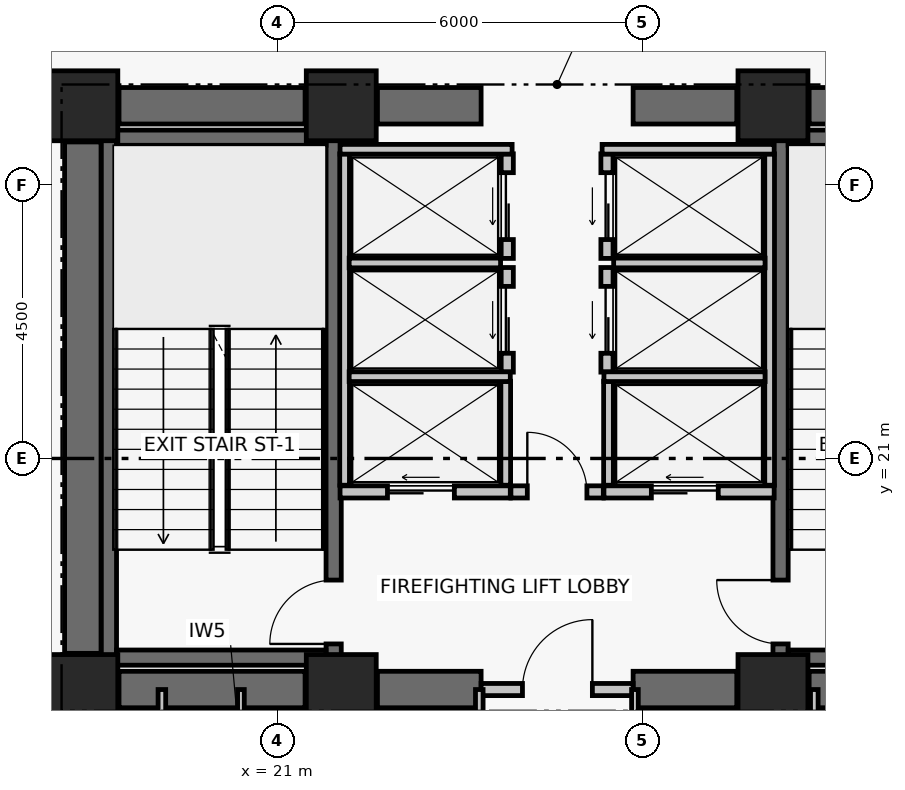
"""IFC4 building model, lengths in metres.
Left out: names, types, materials, properties, quantities, classifications, styles, units other than length and angle.
Written with IfcOpenShell. Run it as: python <this file> out.ifc"""

import sys

from ifc_helpers import new_model, si_unit, direction, frame, frame_2d, origin, origin_2d, place, context, subcontext, project, spatial, rectangle, extrude, element, fill, save


model = new_model("IFC4")
c1 = context("Model", 3, precision=1e-05, world=origin(), true_north=direction((0.0, 1.0)))
c2 = subcontext(c1, "Body", "Model", "MODEL_VIEW")
j1 = project(units=[si_unit("LENGTHUNIT", "METRE"), si_unit("PLANEANGLEUNIT", "RADIAN")], contexts=[c1])
p1 = place(None, origin())
s1 = spatial("IfcSite", under=j1, at=p1, CompositionType="ELEMENT")
p2 = place(p1, origin())
s2 = spatial("IfcBuilding", under=s1, at=p2, CompositionType="ELEMENT")
p3 = place(p2, frame((0.0, 0.0, 61.08)))
s3 = spatial("IfcBuildingStorey", under=s2, at=p3, CompositionType="ELEMENT", Elevation=61.08)
for number, where, z_axis, x_axis in (
    (1, (17.8, 17.2, 0.0), (0.0, 0.0, 1.0), (1.0, 0.0, 0.0)),
    (2, (22.05, 17.2, 0.0), (0.0, 0.0, 1.0), (1.0, 0.0, 0.0)),
    (3, (29.15, 17.2, 0.0), (0.0, 0.0, 1.0), (1.0, 0.0, 0.0)),
    (4, (17.8, 26.8, 0.0), (0.0, 0.0, 1.0), (1.0, 0.0, 0.0)),
    (5, (22.05, 26.8, 0.0), (0.0, 0.0, 1.0), (1.0, 0.0, 0.0)),
    (6, (29.15, 26.8, 0.0), (0.0, 0.0, 1.0), (1.0, 0.0, 0.0)),
):
    element("IfcColumn", number, at=place(p3, frame(where, z_axis=z_axis, x_axis=x_axis)), inside=s3, PredefinedType="COLUMN", context=c2, shape_type="SweptSolid", body=[
        extrude(rectangle(XDim=1.15, YDim=1.15, at=origin_2d()), origin(), (0.0, 0.0, 1.0), 3.72),
    ])
p4 = place(p3, frame((18.395, 17.2, 0.0), z_axis=(0.0, 0.0, 1.0), x_axis=(1.0, 0.0, 0.0)))
e7 = element("IfcWall", 7, at=p4, inside=s3, PredefinedType="SHEAR", context=c2, shape_type="SweptSolid", body=[
    extrude(rectangle(XDim=3.06, YDim=0.6, at=frame_2d((1.53, 0.0))), origin(), (0.0, 0.0, 1.0), 3.47),
])
p5 = place(p3, frame((22.645, 17.2, 0.0), z_axis=(0.0, 0.0, 1.0), x_axis=(1.0, 0.0, 0.0)))
e8 = element("IfcWall", 8, at=p5, inside=s3, PredefinedType="SHEAR", context=c2, shape_type="SweptSolid", body=[
    extrude(rectangle(XDim=1.705, YDim=0.6, at=frame_2d((0.853, 0.0))), origin(), (0.0, 0.0, 1.0), 3.47),
])
p6 = place(p3, frame((26.85, 17.2, 0.0), z_axis=(0.0, 0.0, 1.0), x_axis=(1.0, 0.0, 0.0)))
e9 = element("IfcWall", 9, at=p6, inside=s3, PredefinedType="SHEAR", context=c2, shape_type="SweptSolid", body=[
    extrude(rectangle(XDim=1.705, YDim=0.6, at=frame_2d((0.853, 0.0))), origin(), (0.0, 0.0, 1.0), 3.47),
])
p7 = place(p3, frame((29.745, 17.2, 0.0), z_axis=(0.0, 0.0, 1.0), x_axis=(1.0, 0.0, 0.0)))
e10 = element("IfcWall", 10, at=p7, inside=s3, PredefinedType="SHEAR", context=c2, shape_type="SweptSolid", body=[
    extrude(rectangle(XDim=3.06, YDim=0.6, at=frame_2d((1.53, 0.0))), origin(), (0.0, 0.0, 1.0), 3.47),
])
p8 = place(p3, frame((18.395, 26.8, 0.0), z_axis=(0.0, 0.0, 1.0), x_axis=(1.0, 0.0, 0.0)))
e11 = element("IfcWall", 11, at=p8, inside=s3, PredefinedType="SHEAR", context=c2, shape_type="SweptSolid", body=[
    extrude(rectangle(XDim=3.06, YDim=0.6, at=frame_2d((1.53, 0.0))), origin(), (0.0, 0.0, 1.0), 3.47),
])
p9 = place(p3, frame((22.645, 26.8, 0.0), z_axis=(0.0, 0.0, 1.0), x_axis=(1.0, 0.0, 0.0)))
e12 = element("IfcWall", 12, at=p9, inside=s3, PredefinedType="SHEAR", context=c2, shape_type="SweptSolid", body=[
    extrude(rectangle(XDim=1.705, YDim=0.6, at=frame_2d((0.853, 0.0))), origin(), (0.0, 0.0, 1.0), 3.47),
])
p10 = place(p3, frame((26.85, 26.8, 0.0), z_axis=(0.0, 0.0, 1.0), x_axis=(1.0, 0.0, 0.0)))
e13 = element("IfcWall", 13, at=p10, inside=s3, PredefinedType="SHEAR", context=c2, shape_type="SweptSolid", body=[
    extrude(rectangle(XDim=1.705, YDim=0.6, at=frame_2d((0.853, 0.0))), origin(), (0.0, 0.0, 1.0), 3.47),
])
p11 = place(p3, frame((29.745, 26.8, 0.0), z_axis=(0.0, 0.0, 1.0), x_axis=(1.0, 0.0, 0.0)))
e14 = element("IfcWall", 14, at=p11, inside=s3, PredefinedType="SHEAR", context=c2, shape_type="SweptSolid", body=[
    extrude(rectangle(XDim=3.06, YDim=0.6, at=frame_2d((1.53, 0.0))), origin(), (0.0, 0.0, 1.0), 3.47),
])
p12 = place(p3, frame((17.8, 17.795, 0.0), z_axis=(0.0, 0.0, 1.0), x_axis=(0.0, 1.0, 0.0)))
e15 = element("IfcWall", 15, at=p12, inside=s3, PredefinedType="SHEAR", context=c2, shape_type="SweptSolid", body=[
    extrude(rectangle(XDim=8.41, YDim=0.6, at=frame_2d((4.205, 0.0))), origin(), (0.0, 0.0, 1.0), 3.47),
])
p13 = place(p3, frame((18.229, 17.6, 0.0), z_axis=(0.0, 0.0, 1.0), x_axis=(0.0, 1.0, 0.0)))
e16 = element("IfcWall", 16, at=p13, inside=s3, PredefinedType="SHEAR", context=c2, shape_type="SweptSolid", body=[
    extrude(rectangle(XDim=8.8, YDim=0.25, at=frame_2d((4.4, 0.0))), origin(), (0.0, 0.0, 1.0), 3.47),
])
p14 = place(p3, frame((21.925, 17.6, 0.0), z_axis=(0.0, 0.0, 1.0), x_axis=(0.0, 1.0, 0.0)))
e17 = element("IfcWall", 17, at=p14, inside=s3, PredefinedType="SHEAR", context=c2, shape_type="SweptSolid", body=[
    extrude(rectangle(XDim=8.8, YDim=0.25, at=frame_2d((4.4, 0.0))), origin(), (0.0, 0.0, 1.0), 3.47),
])
p15 = place(p14, frame((0.35, 0.0, 0.0)))
e18 = element("IfcOpeningElement", 18, at=p15, cuts=e17, PredefinedType="OPENING", context=c2, shape_type="SweptSolid", body=[
    extrude(rectangle(XDim=1.05, YDim=2.08, at=frame_2d((0.525, 1.04))), frame((0.0, 0.135, 0.0), z_axis=(0.0, -1.0, 0.0), x_axis=(1.0, 0.0, 0.0)), (0.0, 0.0, 1.0), 0.27),
])
for number, where, z_axis, x_axis in (
    (19, (18.354, 17.725, 0.0), (0.0, 0.0, 1.0), (1.0, 0.0, 0.0)),
    (20, (18.354, 26.275, 0.0), (0.0, 0.0, 1.0), (1.0, 0.0, 0.0)),
):
    element("IfcWall", number, at=place(p3, frame(where, z_axis=z_axis, x_axis=x_axis)), inside=s3, PredefinedType="SHEAR", context=c2, shape_type="SweptSolid", body=[
        extrude(rectangle(XDim=3.446, YDim=0.25, at=frame_2d((1.723, 0.0))), origin(), (0.0, 0.0, 1.0), 3.47),
    ])
p16 = place(p3, frame((29.275, 17.6, 0.0), z_axis=(0.0, 0.0, 1.0), x_axis=(0.0, 1.0, 0.0)))
e21 = element("IfcWall", 21, at=p16, inside=s3, PredefinedType="SHEAR", context=c2, shape_type="SweptSolid", body=[
    extrude(rectangle(XDim=8.8, YDim=0.25, at=frame_2d((4.4, 0.0))), origin(), (0.0, 0.0, 1.0), 3.47),
])
p17 = place(p16, frame((0.35, 0.0, 0.0)))
e22 = element("IfcOpeningElement", 22, at=p17, cuts=e21, PredefinedType="OPENING", context=c2, shape_type="SweptSolid", body=[
    extrude(rectangle(XDim=1.05, YDim=2.08, at=frame_2d((0.525, 1.04))), frame((0.0, 0.135, 0.0), z_axis=(0.0, -1.0, 0.0), x_axis=(1.0, 0.0, 0.0)), (0.0, 0.0, 1.0), 0.27),
])
for number, where, z_axis, x_axis in (
    (23, (29.4, 17.725, 0.0), (0.0, 0.0, 1.0), (1.0, 0.0, 0.0)),
    (24, (29.4, 26.275, 0.0), (0.0, 0.0, 1.0), (1.0, 0.0, 0.0)),
):
    element("IfcWall", number, at=place(p3, frame(where, z_axis=z_axis, x_axis=x_axis)), inside=s3, PredefinedType="SHEAR", context=c2, shape_type="SweptSolid", body=[
        extrude(rectangle(XDim=3.446, YDim=0.25, at=frame_2d((1.723, 0.0))), origin(), (0.0, 0.0, 1.0), 3.47),
    ])
p18 = place(p3, frame((24.35, 17.2, 0.0), z_axis=(0.0, 0.0, 1.0), x_axis=(1.0, 0.0, 0.0)))
e25 = element("IfcWall", 25, at=p18, inside=s3, PredefinedType="PARTITIONING", context=c2, shape_type="SweptSolid", body=[
    extrude(rectangle(XDim=2.5, YDim=0.2, at=frame_2d((1.25, 0.0))), origin(), (0.0, 0.0, 1.0), 2.6),
])
p19 = place(p18, frame((0.68, 0.0, 0.0)))
e26 = element("IfcOpeningElement", 26, at=p19, cuts=e25, PredefinedType="OPENING", context=c2, shape_type="SweptSolid", body=[
    extrude(rectangle(XDim=1.15, YDim=2.08, at=frame_2d((0.575, 1.04))), frame((0.0, 0.11, 0.0), z_axis=(0.0, -1.0, 0.0), x_axis=(1.0, 0.0, 0.0)), (0.0, 0.0, 1.0), 0.22),
])
p20 = place(p3, frame((24.84, 20.45, 0.0), z_axis=(0.0, 0.0, 1.0), x_axis=(1.0, 0.0, 0.0)))
e27 = element("IfcWall", 27, at=p20, inside=s3, PredefinedType="PARTITIONING", context=c2, shape_type="SweptSolid", body=[
    extrude(rectangle(XDim=1.52, YDim=0.2, at=frame_2d((0.76, 0.0))), origin(), (0.0, 0.0, 1.0), 3.47),
])
p21 = place(p20, frame((0.27, 0.0, 0.0)))
e28 = element("IfcOpeningElement", 28, at=p21, cuts=e27, PredefinedType="OPENING", context=c2, shape_type="SweptSolid", body=[
    extrude(rectangle(XDim=0.98, YDim=2.06, at=frame_2d((0.49, 1.03))), frame((0.0, 0.11, 0.0), z_axis=(0.0, -1.0, 0.0), x_axis=(1.0, 0.0, 0.0)), (0.0, 0.0, 1.0), 0.22),
])
p22 = place(p3, frame((22.03, 20.45, 0.0), z_axis=(0.0, 0.0, 1.0), x_axis=(1.0, 0.0, 0.0)))
e29 = element("IfcWall", 29, at=p22, inside=s3, PredefinedType="PARTITIONING", context=c2, shape_type="SweptSolid", body=[
    extrude(rectangle(XDim=2.8, YDim=0.2, at=frame_2d((1.4, 0.0))), origin(), (0.0, 0.0, 1.0), 3.47),
])
p23 = place(p22, frame((0.78, 0.0, 0.0)))
e30 = element("IfcOpeningElement", 30, at=p23, cuts=e29, PredefinedType="OPENING", context=c2, shape_type="SweptSolid", body=[
    extrude(rectangle(XDim=1.1, YDim=2.08, at=frame_2d((0.55, 1.04))), frame((0.0, 0.11, 0.0), z_axis=(0.0, -1.0, 0.0), x_axis=(1.0, 0.0, 0.0)), (0.0, 0.0, 1.0), 0.22),
])
p24 = place(p3, frame((26.37, 20.45, 0.0), z_axis=(0.0, 0.0, 1.0), x_axis=(1.0, 0.0, 0.0)))
e31 = element("IfcWall", 31, at=p24, inside=s3, PredefinedType="PARTITIONING", context=c2, shape_type="SweptSolid", body=[
    extrude(rectangle(XDim=2.8, YDim=0.2, at=frame_2d((1.4, 0.0))), origin(), (0.0, 0.0, 1.0), 3.47),
])
p25 = place(p24, frame((0.78, 0.0, 0.0)))
e32 = element("IfcOpeningElement", 32, at=p25, cuts=e31, PredefinedType="OPENING", context=c2, shape_type="SweptSolid", body=[
    extrude(rectangle(XDim=1.1, YDim=2.08, at=frame_2d((0.55, 1.04))), frame((0.0, 0.11, 0.0), z_axis=(0.0, -1.0, 0.0), x_axis=(1.0, 0.0, 0.0)), (0.0, 0.0, 1.0), 0.22),
])
p26 = place(p3, frame((24.78, 22.42, 0.0), z_axis=(0.0, 0.0, 1.0), x_axis=(0.0, 1.0, 0.0)))
e33 = element("IfcWall", 33, at=p26, inside=s3, PredefinedType="PARTITIONING", context=c2, shape_type="SweptSolid", body=[
    extrude(rectangle(XDim=1.72, YDim=0.2, at=frame_2d((0.86, 0.0))), origin(), (0.0, 0.0, 1.0), 3.47),
])
p27 = place(p26, frame((0.31, 0.0, 0.0)))
e34 = element("IfcOpeningElement", 34, at=p27, cuts=e33, PredefinedType="OPENING", context=c2, shape_type="SweptSolid", body=[
    extrude(rectangle(XDim=1.1, YDim=2.08, at=frame_2d((0.55, 1.04))), frame((0.0, 0.11, 0.0), z_axis=(0.0, -1.0, 0.0), x_axis=(1.0, 0.0, 0.0)), (0.0, 0.0, 1.0), 0.22),
])
p28 = place(p3, frame((24.78, 24.29, 0.0), z_axis=(0.0, 0.0, 1.0), x_axis=(0.0, 1.0, 0.0)))
e35 = element("IfcWall", 35, at=p28, inside=s3, PredefinedType="PARTITIONING", context=c2, shape_type="SweptSolid", body=[
    extrude(rectangle(XDim=1.72, YDim=0.2, at=frame_2d((0.86, 0.0))), origin(), (0.0, 0.0, 1.0), 3.47),
])
p29 = place(p28, frame((0.31, 0.0, 0.0)))
e36 = element("IfcOpeningElement", 36, at=p29, cuts=e35, PredefinedType="OPENING", context=c2, shape_type="SweptSolid", body=[
    extrude(rectangle(XDim=1.1, YDim=2.08, at=frame_2d((0.55, 1.04))), frame((0.0, 0.11, 0.0), z_axis=(0.0, -1.0, 0.0), x_axis=(1.0, 0.0, 0.0)), (0.0, 0.0, 1.0), 0.22),
])
p30 = place(p3, frame((26.42, 22.42, 0.0), z_axis=(0.0, 0.0, 1.0), x_axis=(0.0, 1.0, 0.0)))
e37 = element("IfcWall", 37, at=p30, inside=s3, PredefinedType="PARTITIONING", context=c2, shape_type="SweptSolid", body=[
    extrude(rectangle(XDim=1.72, YDim=0.2, at=frame_2d((0.86, 0.0))), origin(), (0.0, 0.0, 1.0), 3.47),
])
p31 = place(p30, frame((0.31, 0.0, 0.0)))
e38 = element("IfcOpeningElement", 38, at=p31, cuts=e37, PredefinedType="OPENING", context=c2, shape_type="SweptSolid", body=[
    extrude(rectangle(XDim=1.1, YDim=2.08, at=frame_2d((0.55, 1.04))), frame((0.0, 0.11, 0.0), z_axis=(0.0, -1.0, 0.0), x_axis=(1.0, 0.0, 0.0)), (0.0, 0.0, 1.0), 0.22),
])
p32 = place(p3, frame((26.42, 24.29, 0.0), z_axis=(0.0, 0.0, 1.0), x_axis=(0.0, 1.0, 0.0)))
e39 = element("IfcWall", 39, at=p32, inside=s3, PredefinedType="PARTITIONING", context=c2, shape_type="SweptSolid", body=[
    extrude(rectangle(XDim=1.72, YDim=0.2, at=frame_2d((0.86, 0.0))), origin(), (0.0, 0.0, 1.0), 3.47),
])
p33 = place(p32, frame((0.31, 0.0, 0.0)))
e40 = element("IfcOpeningElement", 40, at=p33, cuts=e39, PredefinedType="OPENING", context=c2, shape_type="SweptSolid", body=[
    extrude(rectangle(XDim=1.1, YDim=2.08, at=frame_2d((0.55, 1.04))), frame((0.0, 0.11, 0.0), z_axis=(0.0, -1.0, 0.0), x_axis=(1.0, 0.0, 0.0)), (0.0, 0.0, 1.0), 0.22),
])
p34 = place(p3, frame((22.105, 20.56, 0.0), z_axis=(0.0, 0.0, 1.0), x_axis=(0.0, 1.0, 0.0)))
e41 = element("IfcWall", 41, at=p34, inside=s3, PredefinedType="PARTITIONING", context=c2, shape_type="SweptSolid", body=[
    extrude(rectangle(XDim=5.45, YDim=0.16, at=frame_2d((2.725, 0.0))), origin(), (0.0, 0.0, 1.0), 3.47),
])
p35 = place(p3, frame((24.755, 20.56, 0.0), z_axis=(0.0, 0.0, 1.0), x_axis=(0.0, 1.0, 0.0)))
e42 = element("IfcWall", 42, at=p35, inside=s3, PredefinedType="PARTITIONING", context=c2, shape_type="SweptSolid", body=[
    extrude(rectangle(XDim=1.71, YDim=0.16, at=frame_2d((0.855, 0.0))), origin(), (0.0, 0.0, 1.0), 3.47),
])
p36 = place(p3, frame((22.18, 22.345, 0.0), z_axis=(0.0, 0.0, 1.0), x_axis=(1.0, 0.0, 0.0)))
e43 = element("IfcWall", 43, at=p36, inside=s3, PredefinedType="PARTITIONING", context=c2, shape_type="SweptSolid", body=[
    extrude(rectangle(XDim=2.65, YDim=0.16, at=frame_2d((1.325, 0.0))), origin(), (0.0, 0.0, 1.0), 3.47),
])
p37 = place(p3, frame((22.18, 24.215, 0.0), z_axis=(0.0, 0.0, 1.0), x_axis=(1.0, 0.0, 0.0)))
e44 = element("IfcWall", 44, at=p37, inside=s3, PredefinedType="PARTITIONING", context=c2, shape_type="SweptSolid", body=[
    extrude(rectangle(XDim=2.49, YDim=0.16, at=frame_2d((1.245, 0.0))), origin(), (0.0, 0.0, 1.0), 3.47),
])
p38 = place(p3, frame((22.03, 26.085, 0.0), z_axis=(0.0, 0.0, 1.0), x_axis=(1.0, 0.0, 0.0)))
e45 = element("IfcWall", 45, at=p38, inside=s3, PredefinedType="PARTITIONING", context=c2, shape_type="SweptSolid", body=[
    extrude(rectangle(XDim=2.83, YDim=0.16, at=frame_2d((1.415, 0.0))), origin(), (0.0, 0.0, 1.0), 3.47),
])
p39 = place(p3, frame((29.095, 20.56, 0.0), z_axis=(0.0, 0.0, 1.0), x_axis=(0.0, 1.0, 0.0)))
e46 = element("IfcWall", 46, at=p39, inside=s3, PredefinedType="PARTITIONING", context=c2, shape_type="SweptSolid", body=[
    extrude(rectangle(XDim=5.45, YDim=0.16, at=frame_2d((2.725, 0.0))), origin(), (0.0, 0.0, 1.0), 3.47),
])
p40 = place(p3, frame((26.445, 20.56, 0.0), z_axis=(0.0, 0.0, 1.0), x_axis=(0.0, 1.0, 0.0)))
e47 = element("IfcWall", 47, at=p40, inside=s3, PredefinedType="PARTITIONING", context=c2, shape_type="SweptSolid", body=[
    extrude(rectangle(XDim=1.71, YDim=0.16, at=frame_2d((0.855, 0.0))), origin(), (0.0, 0.0, 1.0), 3.47),
])
p41 = place(p3, frame((26.37, 22.345, 0.0), z_axis=(0.0, 0.0, 1.0), x_axis=(1.0, 0.0, 0.0)))
e48 = element("IfcWall", 48, at=p41, inside=s3, PredefinedType="PARTITIONING", context=c2, shape_type="SweptSolid", body=[
    extrude(rectangle(XDim=2.65, YDim=0.16, at=frame_2d((1.325, 0.0))), origin(), (0.0, 0.0, 1.0), 3.47),
])
p42 = place(p3, frame((26.53, 24.215, 0.0), z_axis=(0.0, 0.0, 1.0), x_axis=(1.0, 0.0, 0.0)))
e49 = element("IfcWall", 49, at=p42, inside=s3, PredefinedType="PARTITIONING", context=c2, shape_type="SweptSolid", body=[
    extrude(rectangle(XDim=2.49, YDim=0.16, at=frame_2d((1.245, 0.0))), origin(), (0.0, 0.0, 1.0), 3.47),
])
p43 = place(p3, frame((26.34, 26.085, 0.0), z_axis=(0.0, 0.0, 1.0), x_axis=(1.0, 0.0, 0.0)))
e50 = element("IfcWall", 50, at=p43, inside=s3, PredefinedType="PARTITIONING", context=c2, shape_type="SweptSolid", body=[
    extrude(rectangle(XDim=2.83, YDim=0.16, at=frame_2d((1.415, 0.0))), origin(), (0.0, 0.0, 1.0), 3.47),
])
p44 = place(p3, frame((19.1, 14.95, 0.0), z_axis=(0.0, 0.0, 1.0), x_axis=(0.0, 1.0, 0.0)))
e51 = element("IfcWall", 51, at=p44, inside=s3, PredefinedType="PARTITIONING", context=c2, shape_type="SweptSolid", body=[
    extrude(rectangle(XDim=2.25, YDim=0.125, at=frame_2d((1.125, 0.0))), origin(), (0.0, 0.0, 1.0), 2.6),
])
p45 = place(p3, frame((20.4, 14.95, 0.0), z_axis=(0.0, 0.0, 1.0), x_axis=(0.0, 1.0, 0.0)))
e52 = element("IfcWall", 52, at=p45, inside=s3, PredefinedType="PARTITIONING", context=c2, shape_type="SweptSolid", body=[
    extrude(rectangle(XDim=2.25, YDim=0.11, at=frame_2d((1.125, 0.0))), origin(), (0.0, 0.0, 1.0), 2.6),
])
for number, where, z_axis, x_axis in (
    (53, (22.36, 14.95, 0.0), (0.0, 0.0, 1.0), (0.0, 1.0, 0.0)),
    (54, (24.32, 14.95, 0.0), (0.0, 0.0, 1.0), (0.0, 1.0, 0.0)),
):
    element("IfcWall", number, at=place(p3, frame(where, z_axis=z_axis, x_axis=x_axis)), inside=s3, PredefinedType="PARTITIONING", context=c2, shape_type="SweptSolid", body=[
        extrude(rectangle(XDim=2.25, YDim=0.125, at=frame_2d((1.125, 0.0))), origin(), (0.0, 0.0, 1.0), 2.6),
    ])
p46 = place(p3, frame((26.88, 14.95, 0.0), z_axis=(0.0, 0.0, 1.0), x_axis=(0.0, 1.0, 0.0)))
e55 = element("IfcWall", 55, at=p46, inside=s3, PredefinedType="PARTITIONING", context=c2, shape_type="SweptSolid", body=[
    extrude(rectangle(XDim=2.25, YDim=0.11, at=frame_2d((1.125, 0.0))), origin(), (0.0, 0.0, 1.0), 2.6),
])
p47 = place(p3, frame((29.83, 14.95, 0.0), z_axis=(0.0, 0.0, 1.0), x_axis=(0.0, 1.0, 0.0)))
e56 = element("IfcWall", 56, at=p47, inside=s3, PredefinedType="PARTITIONING", context=c2, shape_type="SweptSolid", body=[
    extrude(rectangle(XDim=2.25, YDim=0.125, at=frame_2d((1.125, 0.0))), origin(), (0.0, 0.0, 1.0), 2.6),
])
p48 = place(p3, frame((19.737, 36.601, 0.0), z_axis=(0.0, 0.0, 1.0), x_axis=(-0.573585467262, -0.819145720703, 0.0)))
e57 = element("IfcWall", 57, at=p48, inside=s3, PredefinedType="PARTITIONING", context=c2, shape_type="SweptSolid", body=[
    extrude(rectangle(XDim=15.703, YDim=0.125, at=frame_2d((7.851, 0.0))), origin(), (0.0, 0.0, 1.0), 2.6),
])
p49 = place(p48, frame((5.614, 0.0, 0.0)))
e58 = element("IfcOpeningElement", 58, at=p49, cuts=e57, PredefinedType="OPENING", context=c2, shape_type="SweptSolid", body=[
    extrude(rectangle(XDim=0.92, YDim=2.05, at=frame_2d((0.46, 1.025))), frame((0.0, 0.073, 0.0), z_axis=(0.0, -1.0, 0.0), x_axis=(1.0, 0.0, 0.0)), (0.0, 0.0, 1.0), 0.145),
])
p50 = place(p15, origin())
e59 = element("IfcDoor", 59, at=p50, inside=s3, OperationType="SINGLE_SWING_LEFT", PredefinedType="DOOR", context=c2, shape_type="SweptSolid", body=[
    extrude(rectangle(XDim=1.05, YDim=2.08, at=frame_2d((0.525, 1.04))), frame((0.0, 0.025, 0.0), z_axis=(0.0, -1.0, 0.0), x_axis=(1.0, 0.0, 0.0)), (0.0, 0.0, 1.0), 0.05),
])
fill(e18, e59)
p51 = place(p17, origin())
e60 = element("IfcDoor", 60, at=p51, inside=s3, OperationType="SINGLE_SWING_RIGHT", PredefinedType="DOOR", context=c2, shape_type="SweptSolid", body=[
    extrude(rectangle(XDim=1.05, YDim=2.08, at=frame_2d((0.525, 1.04))), frame((0.0, 0.025, 0.0), z_axis=(0.0, -1.0, 0.0), x_axis=(1.0, 0.0, 0.0)), (0.0, 0.0, 1.0), 0.05),
])
fill(e22, e60)
p52 = place(p19, origin())
e61 = element("IfcDoor", 61, at=p52, inside=s3, OperationType="SINGLE_SWING_RIGHT", PredefinedType="DOOR", context=c2, shape_type="SweptSolid", body=[
    extrude(rectangle(XDim=1.15, YDim=2.08, at=frame_2d((0.575, 1.04))), frame((0.0, 0.025, 0.0), z_axis=(0.0, -1.0, 0.0), x_axis=(1.0, 0.0, 0.0)), (0.0, 0.0, 1.0), 0.05),
])
fill(e26, e61)
p53 = place(p21, origin())
e62 = element("IfcDoor", 62, at=p53, inside=s3, OperationType="SINGLE_SWING_LEFT", PredefinedType="DOOR", context=c2, shape_type="SweptSolid", body=[
    extrude(rectangle(XDim=0.98, YDim=2.06, at=frame_2d((0.49, 1.03))), frame((0.0, 0.025, 0.0), z_axis=(0.0, -1.0, 0.0), x_axis=(1.0, 0.0, 0.0)), (0.0, 0.0, 1.0), 0.05),
])
fill(e28, e62)
p54 = place(p23, origin())
e63 = element("IfcDoor", 63, at=p54, inside=s3, OperationType="DOUBLE_DOOR_SLIDING", PredefinedType="DOOR", context=c2, shape_type="SweptSolid", body=[
    extrude(rectangle(XDim=1.1, YDim=2.08, at=frame_2d((0.55, 1.04))), frame((0.0, 0.025, 0.0), z_axis=(0.0, -1.0, 0.0), x_axis=(1.0, 0.0, 0.0)), (0.0, 0.0, 1.0), 0.05),
])
fill(e30, e63)
p55 = place(p25, origin())
e64 = element("IfcDoor", 64, at=p55, inside=s3, OperationType="DOUBLE_DOOR_SLIDING", PredefinedType="DOOR", context=c2, shape_type="SweptSolid", body=[
    extrude(rectangle(XDim=1.1, YDim=2.08, at=frame_2d((0.55, 1.04))), frame((0.0, 0.025, 0.0), z_axis=(0.0, -1.0, 0.0), x_axis=(1.0, 0.0, 0.0)), (0.0, 0.0, 1.0), 0.05),
])
fill(e32, e64)
p56 = place(p27, origin())
e65 = element("IfcDoor", 65, at=p56, inside=s3, OperationType="DOUBLE_DOOR_SLIDING", PredefinedType="DOOR", context=c2, shape_type="SweptSolid", body=[
    extrude(rectangle(XDim=1.1, YDim=2.08, at=frame_2d((0.55, 1.04))), frame((0.0, 0.025, 0.0), z_axis=(0.0, -1.0, 0.0), x_axis=(1.0, 0.0, 0.0)), (0.0, 0.0, 1.0), 0.05),
])
fill(e34, e65)
p57 = place(p29, origin())
e66 = element("IfcDoor", 66, at=p57, inside=s3, OperationType="DOUBLE_DOOR_SLIDING", PredefinedType="DOOR", context=c2, shape_type="SweptSolid", body=[
    extrude(rectangle(XDim=1.1, YDim=2.08, at=frame_2d((0.55, 1.04))), frame((0.0, 0.025, 0.0), z_axis=(0.0, -1.0, 0.0), x_axis=(1.0, 0.0, 0.0)), (0.0, 0.0, 1.0), 0.05),
])
fill(e36, e66)
p58 = place(p31, origin())
e67 = element("IfcDoor", 67, at=p58, inside=s3, OperationType="DOUBLE_DOOR_SLIDING", PredefinedType="DOOR", context=c2, shape_type="SweptSolid", body=[
    extrude(rectangle(XDim=1.1, YDim=2.08, at=frame_2d((0.55, 1.04))), frame((0.0, 0.025, 0.0), z_axis=(0.0, -1.0, 0.0), x_axis=(1.0, 0.0, 0.0)), (0.0, 0.0, 1.0), 0.05),
])
fill(e38, e67)
p59 = place(p33, origin())
e68 = element("IfcDoor", 68, at=p59, inside=s3, OperationType="DOUBLE_DOOR_SLIDING", PredefinedType="DOOR", context=c2, shape_type="SweptSolid", body=[
    extrude(rectangle(XDim=1.1, YDim=2.08, at=frame_2d((0.55, 1.04))), frame((0.0, 0.025, 0.0), z_axis=(0.0, -1.0, 0.0), x_axis=(1.0, 0.0, 0.0)), (0.0, 0.0, 1.0), 0.05),
])
fill(e40, e68)
save(model, sys.argv[1])
